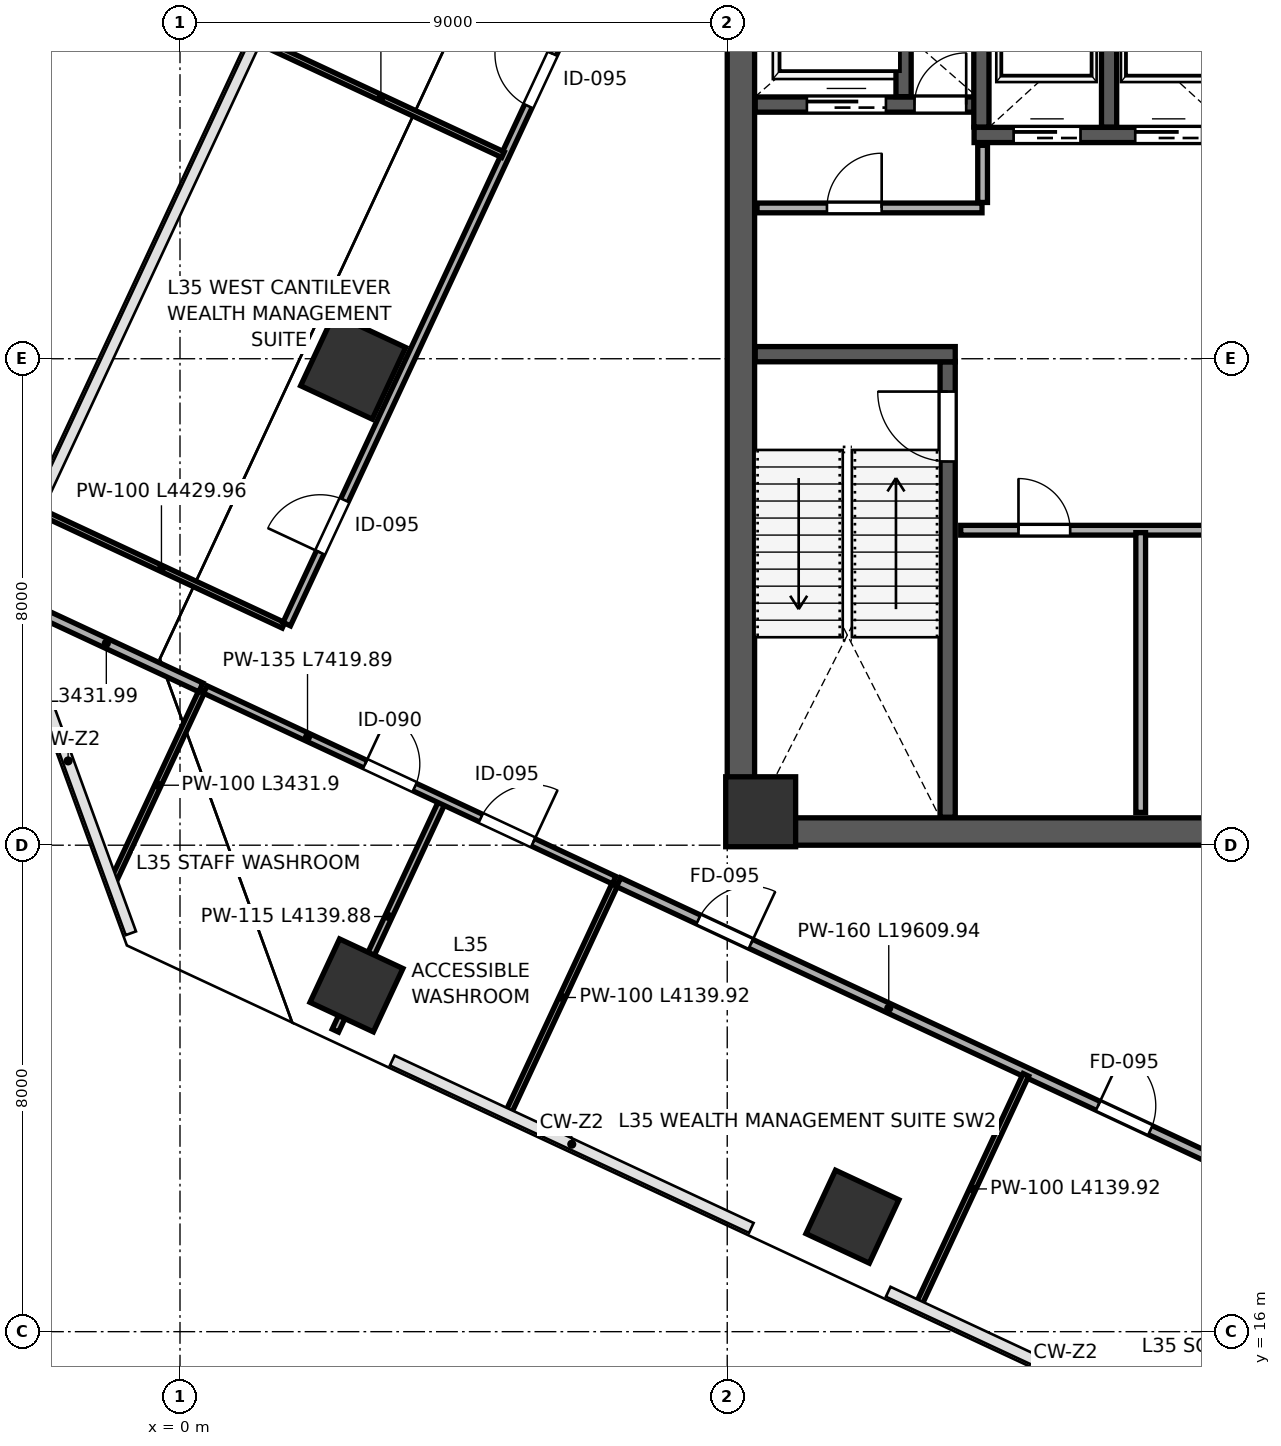
"""IFC4 building model, lengths in metres.
Left out: names, types, materials, properties, quantities, classifications, styles, units other than length and angle.
Written with IfcOpenShell. Run it as: python <this file> out.ifc"""

import sys

from ifc_helpers import new_model, si_unit, direction, frame, frame_2d, origin, origin_2d, place, context, subcontext, project, spatial, rectangle, extrude, clip, halfspace, source, transform, mapped, element, fill, save


model = new_model("IFC4")
c1 = context("Model", 3, precision=1e-05, world=origin(), true_north=direction((0.0, 1.0)))
c2 = subcontext(c1, "Body", "Model", "MODEL_VIEW")
j1 = project(units=[si_unit("LENGTHUNIT", "METRE"), si_unit("PLANEANGLEUNIT", "RADIAN")], contexts=[c1])
p1 = place(None, origin())
s1 = spatial("IfcSite", under=j1, at=p1, CompositionType="ELEMENT")
p2 = place(p1, origin())
s2 = spatial("IfcBuilding", under=s1, at=p2, CompositionType="ELEMENT")
p3 = place(p2, frame((0.0, 0.0, 158.2)))
s3 = spatial("IfcBuildingStorey", under=s2, at=p3, CompositionType="ELEMENT", Elevation=158.2)
m1 = source(origin(), c2, "Body", "SweptSolid", [
    extrude(rectangle(XDim=1.15, YDim=1.15, at=origin_2d()), origin(), (0.0, 0.0, 1.0), 4.198),
])
p4 = place(p3, frame((9.55, 24.55, 0.001), z_axis=(0.0, 0.0, 1.0), x_axis=(1.0, 0.0, 0.0)))
e1 = element("IfcColumn", 1, at=p4, inside=s3, PredefinedType="COLUMN", context=c2, shape_type="MappedRepresentation", body=[
    mapped(m1, transform((0.0, 0.0, 0.0), scale=1.0)),
])
p5 = place(p3, frame((2.902, 21.694, 0.0), z_axis=(-0.052173508462, 0.096604768715, 0.993954447486), x_axis=(0.9970543434, 0.061070597403, 0.046400629729)))
e2 = element("IfcColumn", 2, at=p5, inside=s3, PredefinedType="COLUMN", context=c2, shape_type="Clipping", body=[
    clip(clip(extrude(rectangle(XDim=1.15, YDim=1.15, at=origin_2d()), origin(), (0.0, 0.0, 1.0), 4.226), halfspace(frame((0.0, 0.0, 0.085), z_axis=(0.0, 0.0, -1.0), x_axis=(1.0, 0.0, 0.0)), False)), halfspace(frame((0.0, 0.0, 4.14), z_axis=(0.0, 0.0, 1.0), x_axis=(1.0, 0.0, 0.0)), False)),
])
p6 = place(p3, frame((11.059, 17.891, 0.0), z_axis=(-0.072361701671, 0.054821225186, 0.995870683071), x_axis=(0.882762810031, 0.468249744812, 0.038366622345)))
e3 = element("IfcColumn", 3, at=p6, inside=s3, PredefinedType="COLUMN", context=c2, shape_type="Clipping", body=[
    clip(clip(extrude(rectangle(XDim=1.15, YDim=1.15, at=origin_2d()), origin(), (0.0, 0.0, 1.0), 4.217), halfspace(frame((0.0, 0.0, 0.07), z_axis=(0.0, 0.0, -1.0), x_axis=(1.0, 0.0, 0.0)), False)), halfspace(frame((0.0, 0.0, 4.147), z_axis=(0.0, 0.0, 1.0), x_axis=(1.0, 0.0, 0.0)), False)),
])
p7 = place(p3, frame((2.848, 31.871, 0.0), z_axis=(0.000347150303, 0.096449925889, 0.995337777482), x_axis=(0.904787896664, -0.423907231175, 0.040761764052)))
e4 = element("IfcColumn", 4, at=p7, inside=s3, PredefinedType="COLUMN", context=c2, shape_type="Clipping", body=[
    clip(clip(extrude(rectangle(XDim=1.3, YDim=1.3, at=origin_2d()), origin(), (0.0, 0.0, 1.0), 4.22), halfspace(frame((0.0, 0.0, 0.084), z_axis=(0.0, 0.0, -1.0), x_axis=(1.0, 0.0, 0.0)), False)), halfspace(frame((0.0, 0.0, 4.135), z_axis=(0.0, 0.0, 1.0), x_axis=(1.0, 0.0, 0.0)), False)),
])
p8 = place(p3, frame((9.225, 24.45, 0.0), z_axis=(0.0, 0.0, 1.0), x_axis=(0.0, 1.0, 0.0)))
e5 = element("IfcWall", 5, at=p8, inside=s3, PredefinedType="SHEAR", context=c2, shape_type="SweptSolid", body=[
    extrude(rectangle(XDim=15.1, YDim=0.45, at=frame_2d((7.55, 0.0))), origin(), (0.0, 0.0, 1.0), 3.96),
])
p9 = place(p3, frame((9.0, 24.225, 0.0), z_axis=(0.0, 0.0, 1.0), x_axis=(1.0, 0.0, 0.0)))
e6 = element("IfcWall", 6, at=p9, inside=s3, PredefinedType="SHEAR", context=c2, shape_type="SweptSolid", body=[
    extrude(rectangle(XDim=18.0, YDim=0.45, at=frame_2d((9.0, 0.0))), origin(), (0.0, 0.0, 1.0), 3.96),
])
p10 = place(p3, frame((12.625, 24.46, 0.0), z_axis=(0.0, 0.0, 1.0), x_axis=(0.0, 1.0, 0.0)))
e7 = element("IfcWall", 7, at=p10, inside=s3, PredefinedType="SHEAR", context=c2, shape_type="SweptSolid", body=[
    extrude(rectangle(XDim=7.49, YDim=0.25, at=frame_2d((3.745, 0.0))), origin(), (0.0, 0.0, 1.0), 3.96),
])
p11 = place(p10, frame((5.85, 0.0, 0.0)))
e8 = element("IfcOpeningElement", 8, at=p11, cuts=e7, PredefinedType="OPENING", context=c2, shape_type="SweptSolid", body=[
    extrude(rectangle(XDim=1.15, YDim=2.2, at=frame_2d((0.575, 1.1))), frame((0.0, 0.135, 0.0), z_axis=(0.0, -1.0, 0.0), x_axis=(1.0, 0.0, 0.0)), (0.0, 0.0, 1.0), 0.27),
])
p12 = place(p3, frame((9.46, 32.075, 0.0), z_axis=(0.0, 0.0, 1.0), x_axis=(1.0, 0.0, 0.0)))
e9 = element("IfcWall", 9, at=p12, inside=s3, PredefinedType="SHEAR", context=c2, shape_type="SweptSolid", body=[
    extrude(rectangle(XDim=3.29, YDim=0.25, at=frame_2d((1.645, 0.0))), origin(), (0.0, 0.0, 1.0), 3.96),
])
p13 = place(p3, frame((9.46, 36.18, 0.0), z_axis=(0.0, 0.0, 1.0), x_axis=(1.0, 0.0, 0.0)))
e10 = element("IfcWall", 10, at=p13, inside=s3, PredefinedType="SHEAR", context=c2, shape_type="SweptSolid", body=[
    extrude(rectangle(XDim=3.79, YDim=0.25, at=frame_2d((1.895, 0.0))), origin(), (0.0, 0.0, 1.0), 3.96),
])
p14 = place(p13, frame((2.62, 0.0, 0.0)))
e11 = element("IfcOpeningElement", 11, at=p14, cuts=e10, PredefinedType="OPENING", context=c2, shape_type="SweptSolid", body=[
    extrude(rectangle(XDim=0.85, YDim=2.1, at=frame_2d((0.425, 1.05))), frame((0.0, 0.135, 0.0), z_axis=(0.0, -1.0, 0.0), x_axis=(1.0, 0.0, 0.0)), (0.0, 0.0, 1.0), 0.27),
])
p15 = place(p13, frame((0.85, 0.0, 0.0)))
e12 = element("IfcOpeningElement", 12, at=p15, cuts=e10, PredefinedType="OPENING", context=c2, shape_type="SweptSolid", body=[
    extrude(rectangle(XDim=1.3, YDim=2.25, at=frame_2d((0.65, 1.125))), frame((0.0, 0.135, 0.0), z_axis=(0.0, -1.0, 0.0), x_axis=(1.0, 0.0, 0.0)), (0.0, 0.0, 1.0), 0.27),
])
p16 = place(p3, frame((11.9, 36.31, 0.0), z_axis=(0.0, 0.0, 1.0), x_axis=(0.0, 1.0, 0.0)))
e13 = element("IfcWall", 13, at=p16, inside=s3, PredefinedType="SHEAR", context=c2, shape_type="SweptSolid", body=[
    extrude(rectangle(XDim=3.23, YDim=0.25, at=frame_2d((1.615, 0.0))), origin(), (0.0, 0.0, 1.0), 3.96),
])
p17 = place(p3, frame((13.06, 35.68, 0.0), z_axis=(0.0, 0.0, 1.0), x_axis=(1.0, 0.0, 0.0)))
e14 = element("IfcWall", 14, at=p17, inside=s3, PredefinedType="SHEAR", context=c2, shape_type="SweptSolid", body=[
    extrude(rectangle(XDim=4.25, YDim=0.25, at=frame_2d((2.125, 0.0))), origin(), (0.0, 0.0, 1.0), 3.96),
])
p18 = place(p17, frame((0.65, 0.0, 0.0)))
e15 = element("IfcOpeningElement", 15, at=p18, cuts=e14, PredefinedType="OPENING", context=c2, shape_type="SweptSolid", body=[
    extrude(rectangle(XDim=1.1, YDim=2.2, at=frame_2d((0.55, 1.1))), frame((0.0, 0.135, 0.0), z_axis=(0.0, -1.0, 0.0), x_axis=(1.0, 0.0, 0.0)), (0.0, 0.0, 1.0), 0.27),
])
p19 = place(p17, frame((2.65, 0.0, 0.0)))
e16 = element("IfcOpeningElement", 16, at=p19, cuts=e14, PredefinedType="OPENING", context=c2, shape_type="SweptSolid", body=[
    extrude(rectangle(XDim=1.1, YDim=2.2, at=frame_2d((0.55, 1.1))), frame((0.0, 0.135, 0.0), z_axis=(0.0, -1.0, 0.0), x_axis=(1.0, 0.0, 0.0)), (0.0, 0.0, 1.0), 0.27),
])
for number, where, z_axis, x_axis in (
    (17, (13.18, 35.81, 0.0), (0.0, 0.0, 1.0), (0.0, 1.0, 0.0)),
    (18, (15.28, 35.81, 0.0), (0.0, 0.0, 1.0), (0.0, 1.0, 0.0)),
):
    element("IfcWall", number, at=place(p3, frame(where, z_axis=z_axis, x_axis=x_axis)), inside=s3, PredefinedType="SHEAR", context=c2, shape_type="SweptSolid", body=[
        extrude(rectangle(XDim=3.73, YDim=0.25, at=frame_2d((1.865, 0.0))), origin(), (0.0, 0.0, 1.0), 3.96),
    ])
p20 = place(p3, frame((9.49, 34.48, 0.0), z_axis=(0.0, 0.0, 1.0), x_axis=(1.0, 0.0, 0.0)))
e19 = element("IfcWall", 19, at=p20, inside=s3, PredefinedType="PARTITIONING", context=c2, shape_type="SweptSolid", body=[
    extrude(rectangle(XDim=3.7, YDim=0.16, at=frame_2d((1.85, 0.0))), origin(), (0.0, 0.0, 1.0), 3.96),
])
p21 = place(p20, frame((1.15, 0.0, 0.0)))
e20 = element("IfcOpeningElement", 20, at=p21, cuts=e19, PredefinedType="OPENING", context=c2, shape_type="SweptSolid", body=[
    extrude(rectangle(XDim=0.9, YDim=2.15, at=frame_2d((0.45, 1.075))), frame((0.0, 0.09, 0.0), z_axis=(0.0, -1.0, 0.0), x_axis=(1.0, 0.0, 0.0)), (0.0, 0.0, 1.0), 0.18),
])
p22 = place(p3, frame((13.2, 34.57, 0.0), z_axis=(0.0, 0.0, 1.0), x_axis=(0.0, 1.0, 0.0)))
e21 = element("IfcWall", 21, at=p22, inside=s3, PredefinedType="PARTITIONING", context=c2, shape_type="SweptSolid", body=[
    extrude(rectangle(XDim=0.94, YDim=0.16, at=frame_2d((0.47, 0.0))), origin(), (0.0, 0.0, 1.0), 3.96),
])
p23 = place(p3, frame((12.84, 29.18, 0.0), z_axis=(0.0, 0.0, 1.0), x_axis=(1.0, 0.0, 0.0)))
e22 = element("IfcWall", 22, at=p23, inside=s3, PredefinedType="PARTITIONING", context=c2, shape_type="SweptSolid", body=[
    extrude(rectangle(XDim=8.37, YDim=0.16, at=frame_2d((4.185, 0.0))), origin(), (0.0, 0.0, 1.0), 3.96),
])
p24 = place(p23, frame((0.95, 0.0, 0.0)))
e23 = element("IfcOpeningElement", 23, at=p24, cuts=e22, PredefinedType="OPENING", context=c2, shape_type="SweptSolid", body=[
    extrude(rectangle(XDim=0.85, YDim=2.1, at=frame_2d((0.425, 1.05))), frame((0.0, 0.09, 0.0), z_axis=(0.0, -1.0, 0.0), x_axis=(1.0, 0.0, 0.0)), (0.0, 0.0, 1.0), 0.18),
])
p25 = place(p23, frame((4.2, 0.0, 0.0)))
e24 = element("IfcOpeningElement", 24, at=p25, cuts=e22, PredefinedType="OPENING", context=c2, shape_type="SweptSolid", body=[
    extrude(rectangle(XDim=0.85, YDim=2.1, at=frame_2d((0.425, 1.05))), frame((0.0, 0.09, 0.0), z_axis=(0.0, -1.0, 0.0), x_axis=(1.0, 0.0, 0.0)), (0.0, 0.0, 1.0), 0.18),
])
p26 = place(p3, frame((15.8, 24.54, 0.0), z_axis=(0.0, 0.0, 1.0), x_axis=(0.0, 1.0, 0.0)))
e25 = element("IfcWall", 25, at=p26, inside=s3, PredefinedType="PARTITIONING", context=c2, shape_type="SweptSolid", body=[
    extrude(rectangle(XDim=4.6, YDim=0.16, at=frame_2d((2.3, 0.0))), origin(), (0.0, 0.0, 1.0), 3.96),
])
p27 = place(p3, frame((-1.088, 23.431, 0.0), z_axis=(0.0, 0.0, 1.0), x_axis=(0.422632310917, 0.906301235665, 0.0)))
e26 = element("IfcWall", 26, at=p27, inside=s3, PredefinedType="PARTITIONING", context=c2, shape_type="SweptSolid", body=[
    extrude(rectangle(XDim=3.432, YDim=0.1, at=frame_2d((1.716, 0.0))), origin(), (0.0, 0.0, 1.0), 3.96),
])
p28 = place(p3, frame((-2.767, 28.045, 0.0), z_axis=(0.0, 0.0, 1.0), x_axis=(0.906313941013, -0.422605064246, 0.0)))
e27 = element("IfcWall", 27, at=p28, inside=s3, PredefinedType="PARTITIONING", context=c2, shape_type="SweptSolid", body=[
    extrude(rectangle(XDim=3.432, YDim=0.16, at=frame_2d((1.716, 0.0))), origin(), (0.0, 0.0, 1.0), 3.96),
])
p29 = place(p3, frame((2.556, 20.951, 0.0), z_axis=(0.0, 0.0, 1.0), x_axis=(0.422607794095, 0.906312668106, 0.0)))
e28 = element("IfcWall", 28, at=p29, inside=s3, PredefinedType="PARTITIONING", context=c2, shape_type="SweptSolid", body=[
    extrude(rectangle(XDim=4.14, YDim=0.115, at=frame_2d((2.07, 0.0))), origin(), (0.0, 0.0, 1.0), 3.195),
])
p30 = place(p3, frame((5.41, 19.62, 0.0), z_axis=(0.0, 0.0, 1.0), x_axis=(0.422656233697, 0.906290079454, 0.0)))
e29 = element("IfcWall", 29, at=p30, inside=s3, PredefinedType="PARTITIONING", context=c2, shape_type="SweptSolid", body=[
    extrude(rectangle(XDim=4.14, YDim=0.1, at=frame_2d((2.07, 0.0))), origin(), (0.0, 0.0, 1.0), 3.195),
])
p31 = place(p3, frame((0.416, 26.561, 0.0), z_axis=(0.0, 0.0, 1.0), x_axis=(0.906307511488, -0.422618852656, 0.0)))
e30 = element("IfcWall", 30, at=p31, inside=s3, PredefinedType="PARTITIONING", context=c2, shape_type="SweptSolid", body=[
    extrude(rectangle(XDim=7.42, YDim=0.135, at=frame_2d((3.71, 0.0))), origin(), (0.0, 0.0, 1.0), 3.96),
])
p32 = place(p31, frame((2.9, 0.0, 0.0)))
e31 = element("IfcOpeningElement", 31, at=p32, cuts=e30, PredefinedType="OPENING", context=c2, shape_type="SweptSolid", body=[
    extrude(rectangle(XDim=0.9, YDim=2.15, at=frame_2d((0.45, 1.075))), frame((0.0, 0.078, 0.0), z_axis=(0.0, -1.0, 0.0), x_axis=(1.0, 0.0, 0.0)), (0.0, 0.0, 1.0), 0.155),
])
p33 = place(p31, frame((5.0, 0.0, 0.0)))
e32 = element("IfcOpeningElement", 32, at=p33, cuts=e30, PredefinedType="OPENING", context=c2, shape_type="SweptSolid", body=[
    extrude(rectangle(XDim=0.95, YDim=2.15, at=frame_2d((0.475, 1.075))), frame((0.0, 0.078, 0.0), z_axis=(0.0, -1.0, 0.0), x_axis=(1.0, 0.0, 0.0)), (0.0, 0.0, 1.0), 0.155),
])
p34 = place(p3, frame((7.213, 23.391, 0.0), z_axis=(0.0, 0.0, 1.0), x_axis=(0.906304602938, -0.422625089996, 0.0)))
e33 = element("IfcWall", 33, at=p34, inside=s3, PredefinedType="PARTITIONING", context=c2, shape_type="SweptSolid", body=[
    extrude(rectangle(XDim=19.61, YDim=0.16, at=frame_2d((9.805, 0.0))), origin(), (0.0, 0.0, 1.0), 3.96),
])
p35 = place(p34, frame((1.45, 0.0, 0.0)))
e34 = element("IfcOpeningElement", 34, at=p35, cuts=e33, PredefinedType="OPENING", context=c2, shape_type="SweptSolid", body=[
    extrude(rectangle(XDim=0.95, YDim=2.15, at=frame_2d((0.475, 1.075))), frame((0.0, 0.09, 0.0), z_axis=(0.0, -1.0, 0.0), x_axis=(1.0, 0.0, 0.0)), (0.0, 0.0, 1.0), 0.18),
])
p36 = place(p34, frame((8.7, 0.0, 0.0)))
e35 = element("IfcOpeningElement", 35, at=p36, cuts=e33, PredefinedType="OPENING", context=c2, shape_type="SweptSolid", body=[
    extrude(rectangle(XDim=0.95, YDim=2.15, at=frame_2d((0.475, 1.075))), frame((0.0, 0.09, 0.0), z_axis=(0.0, -1.0, 0.0), x_axis=(1.0, 0.0, 0.0)), (0.0, 0.0, 1.0), 0.18),
])
p37 = place(p3, frame((12.162, 16.471, 0.0), z_axis=(0.0, 0.0, 1.0), x_axis=(0.422656233697, 0.906290079454, 0.0)))
e36 = element("IfcWall", 36, at=p37, inside=s3, PredefinedType="PARTITIONING", context=c2, shape_type="SweptSolid", body=[
    extrude(rectangle(XDim=4.14, YDim=0.1, at=frame_2d((2.07, 0.0))), origin(), (0.0, 0.0, 1.0), 3.195),
])
p38 = place(p3, frame((-2.312, 29.488, 0.0), z_axis=(0.0, 0.0, 1.0), x_axis=(0.906316851894, -0.422598821546, 0.0)))
e37 = element("IfcWall", 37, at=p38, inside=s3, PredefinedType="PARTITIONING", context=c2, shape_type="SweptSolid", body=[
    extrude(rectangle(XDim=4.43, YDim=0.1, at=frame_2d((2.215, 0.0))), origin(), (0.0, 0.0, 1.0), 3.96),
])
p39 = place(p3, frame((1.756, 27.635, 0.0), z_axis=(0.0, 0.0, 1.0), x_axis=(0.422615732035, 0.906308966653, 0.0)))
e38 = element("IfcWall", 38, at=p39, inside=s3, PredefinedType="PARTITIONING", context=c2, shape_type="SweptSolid", body=[
    extrude(rectangle(XDim=23.34, YDim=0.135, at=frame_2d((11.67, 0.0))), origin(), (0.0, 0.0, 1.0), 3.96),
])
p40 = place(p39, frame((1.3, 0.0, 0.0)))
e39 = element("IfcOpeningElement", 39, at=p40, cuts=e38, PredefinedType="OPENING", context=c2, shape_type="SweptSolid", body=[
    extrude(rectangle(XDim=0.95, YDim=2.15, at=frame_2d((0.475, 1.075))), frame((0.0, 0.078, 0.0), z_axis=(0.0, -1.0, 0.0), x_axis=(1.0, 0.0, 0.0)), (0.0, 0.0, 1.0), 0.155),
])
p41 = place(p39, frame((9.4, 0.0, 0.0)))
e40 = element("IfcOpeningElement", 40, at=p41, cuts=e38, PredefinedType="OPENING", context=c2, shape_type="SweptSolid", body=[
    extrude(rectangle(XDim=0.95, YDim=2.15, at=frame_2d((0.475, 1.075))), frame((0.0, 0.078, 0.0), z_axis=(0.0, -1.0, 0.0), x_axis=(1.0, 0.0, 0.0)), (0.0, 0.0, 1.0), 0.155),
])
p42 = place(p3, frame((1.297, 37.228, 0.0), z_axis=(0.0, 0.0, 1.0), x_axis=(0.906295742894, -0.422644089526, 0.0)))
e41 = element("IfcWall", 41, at=p42, inside=s3, PredefinedType="PARTITIONING", context=c2, shape_type="SweptSolid", body=[
    extrude(rectangle(XDim=4.43, YDim=0.1, at=frame_2d((2.215, 0.0))), origin(), (0.0, 0.0, 1.0), 3.195),
])
m2 = source(origin(), c2, "Body", "SweptSolid", [
    extrude(rectangle(XDim=1.15, YDim=2.2, at=frame_2d((0.575, 1.1))), frame((0.0, 0.025, 0.0), z_axis=(0.0, -1.0, 0.0), x_axis=(1.0, 0.0, 0.0)), (0.0, 0.0, 1.0), 0.05),
])
p43 = place(p11, origin())
e42 = element("IfcDoor", 42, at=p43, inside=s3, OperationType="SINGLE_SWING_RIGHT", PredefinedType="DOOR", context=c2, shape_type="MappedRepresentation", body=[
    mapped(m2, transform((0.0, 0.0, 0.0), scale=1.0)),
])
fill(e8, e42)
m3 = source(origin(), c2, "Body", "SweptSolid", [
    extrude(rectangle(XDim=0.85, YDim=2.1, at=frame_2d((0.425, 1.05))), frame((0.0, 0.025, 0.0), z_axis=(0.0, -1.0, 0.0), x_axis=(1.0, 0.0, 0.0)), (0.0, 0.0, 1.0), 0.05),
])
p44 = place(p14, origin())
e43 = element("IfcDoor", 43, at=p44, inside=s3, OperationType="SINGLE_SWING_RIGHT", PredefinedType="DOOR", context=c2, shape_type="MappedRepresentation", body=[
    mapped(m3, transform((0.0, 0.0, 0.0), scale=1.0)),
])
fill(e11, e43)
m4 = source(origin(), c2, "Body", "SweptSolid", [
    extrude(rectangle(XDim=1.1, YDim=2.2, at=frame_2d((0.55, 1.1))), frame((0.0, 0.025, 0.0), z_axis=(0.0, -1.0, 0.0), x_axis=(1.0, 0.0, 0.0)), (0.0, 0.0, 1.0), 0.05),
])
p45 = place(p18, origin())
e44 = element("IfcDoor", 44, at=p45, inside=s3, OperationType="SLIDING_TO_LEFT", PredefinedType="DOOR", context=c2, shape_type="MappedRepresentation", body=[
    mapped(m4, transform((0.0, 0.0, 0.0), scale=1.0)),
])
fill(e15, e44)
p46 = place(p19, origin())
e45 = element("IfcDoor", 45, at=p46, inside=s3, OperationType="SLIDING_TO_RIGHT", PredefinedType="DOOR", context=c2, shape_type="MappedRepresentation", body=[
    mapped(m4, transform((0.0, 0.0, 0.0), scale=1.0)),
])
fill(e16, e45)
m5 = source(origin(), c2, "Body", "SweptSolid", [
    extrude(rectangle(XDim=1.3, YDim=2.25, at=frame_2d((0.65, 1.125))), frame((0.0, 0.025, 0.0), z_axis=(0.0, -1.0, 0.0), x_axis=(1.0, 0.0, 0.0)), (0.0, 0.0, 1.0), 0.05),
])
p47 = place(p15, origin())
e46 = element("IfcDoor", 46, at=p47, inside=s3, OperationType="SLIDING_TO_LEFT", PredefinedType="DOOR", context=c2, shape_type="MappedRepresentation", body=[
    mapped(m5, transform((0.0, 0.0, 0.0), scale=1.0)),
])
fill(e12, e46)
m6 = source(origin(), c2, "Body", "SweptSolid", [
    extrude(rectangle(XDim=0.9, YDim=2.15, at=frame_2d((0.45, 1.075))), frame((0.0, 0.025, 0.0), z_axis=(0.0, -1.0, 0.0), x_axis=(1.0, 0.0, 0.0)), (0.0, 0.0, 1.0), 0.05),
])
p48 = place(p21, origin())
e47 = element("IfcDoor", 47, at=p48, inside=s3, OperationType="SINGLE_SWING_RIGHT", PredefinedType="DOOR", context=c2, shape_type="MappedRepresentation", body=[
    mapped(m6, transform((0.0, 0.0, 0.0), scale=1.0)),
])
fill(e20, e47)
p49 = place(p24, origin())
e48 = element("IfcDoor", 48, at=p49, inside=s3, OperationType="SINGLE_SWING_LEFT", PredefinedType="DOOR", context=c2, shape_type="MappedRepresentation", body=[
    mapped(m3, transform((0.0, 0.0, 0.0), scale=1.0)),
])
fill(e23, e48)
m7 = source(origin(), c2, "Body", "SweptSolid", [
    extrude(rectangle(XDim=0.9, YDim=2.15, at=frame_2d((0.45, 1.075))), frame((0.0, 0.025, 0.0), z_axis=(0.0, -1.0, 0.0), x_axis=(1.0, 0.0, 0.0)), (0.0, 0.0, 1.0), 0.05),
])
p50 = place(p32, origin())
e49 = element("IfcDoor", 49, at=p50, inside=s3, OperationType="SINGLE_SWING_LEFT", PredefinedType="DOOR", context=c2, shape_type="MappedRepresentation", body=[
    mapped(m7, transform((0.0, 0.0, 0.0), scale=1.0)),
])
fill(e31, e49)
m8 = source(origin(), c2, "Body", "SweptSolid", [
    extrude(rectangle(XDim=0.95, YDim=2.15, at=frame_2d((0.475, 1.075))), frame((0.0, 0.025, 0.0), z_axis=(0.0, -1.0, 0.0), x_axis=(1.0, 0.0, 0.0)), (0.0, 0.0, 1.0), 0.05),
])
p51 = place(p33, origin())
e50 = element("IfcDoor", 50, at=p51, inside=s3, OperationType="SINGLE_SWING_RIGHT", PredefinedType="DOOR", context=c2, shape_type="MappedRepresentation", body=[
    mapped(m8, transform((0.0, 0.0, 0.0), scale=1.0)),
])
fill(e32, e50)
m9 = source(origin(), c2, "Body", "SweptSolid", [
    extrude(rectangle(XDim=0.95, YDim=2.15, at=frame_2d((0.475, 1.075))), frame((0.0, 0.025, 0.0), z_axis=(0.0, -1.0, 0.0), x_axis=(1.0, 0.0, 0.0)), (0.0, 0.0, 1.0), 0.05),
])
p52 = place(p35, origin())
e51 = element("IfcDoor", 51, at=p52, inside=s3, OperationType="SINGLE_SWING_RIGHT", PredefinedType="DOOR", context=c2, shape_type="MappedRepresentation", body=[
    mapped(m9, transform((0.0, 0.0, 0.0), scale=1.0)),
])
fill(e34, e51)
p53 = place(p36, origin())
e52 = element("IfcDoor", 52, at=p53, inside=s3, OperationType="SINGLE_SWING_LEFT", PredefinedType="DOOR", context=c2, shape_type="MappedRepresentation", body=[
    mapped(m9, transform((0.0, 0.0, 0.0), scale=1.0)),
])
fill(e35, e52)
p54 = place(p40, origin())
e53 = element("IfcDoor", 53, at=p54, inside=s3, OperationType="SINGLE_SWING_LEFT", PredefinedType="DOOR", context=c2, shape_type="MappedRepresentation", body=[
    mapped(m8, transform((0.0, 0.0, 0.0), scale=1.0)),
])
fill(e39, e53)
p55 = place(p41, origin())
e54 = element("IfcDoor", 54, at=p55, inside=s3, OperationType="SINGLE_SWING_RIGHT", PredefinedType="DOOR", context=c2, shape_type="MappedRepresentation", body=[
    mapped(m8, transform((0.0, 0.0, 0.0), scale=1.0)),
])
fill(e40, e54)
save(model, sys.argv[1])
